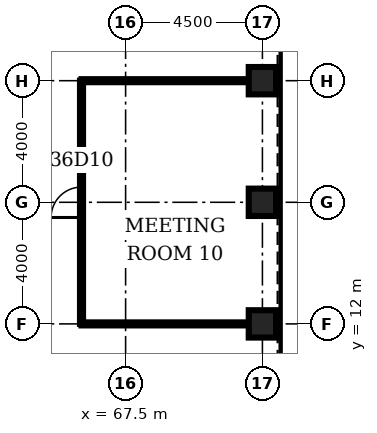
"""IFC4 building model, lengths in metres.
Left out: names, types, materials, properties, quantities, classifications, styles, units other than length and angle.
Written with IfcOpenShell. Run it as: python <this file> out.ifc"""

import sys

from ifc_helpers import new_model, si_unit, direction, frame, frame_2d, origin, origin_2d, place, context, subcontext, project, spatial, rectangle, hollow_rectangle, extrude, element, fill, save


model = new_model("IFC4")
c1 = context("Model", 3, precision=1e-05, world=origin(), true_north=direction((0.0, 1.0)))
c2 = subcontext(c1, "Body", "Model", "MODEL_VIEW")
j1 = project(units=[si_unit("LENGTHUNIT", "METRE"), si_unit("PLANEANGLEUNIT", "RADIAN")], contexts=[c1])
p1 = place(None, origin())
s1 = spatial("IfcSite", under=j1, at=p1, CompositionType="ELEMENT")
p2 = place(p1, origin())
s2 = spatial("IfcBuilding", under=s1, at=p2, CompositionType="ELEMENT")
p3 = place(p2, frame((0.0, 0.0, 163.5)))
s3 = spatial("IfcBuildingStorey", under=s2, at=p3, CompositionType="ELEMENT", Elevation=163.5)
for number, where, z_axis, x_axis in (
    (1, (72.0, 12.0, 0.0), (0.0, 0.0, 1.0), (1.0, 0.0, 0.0)),
    (2, (72.0, 16.0, 0.0), (0.0, 0.0, 1.0), (1.0, 0.0, 0.0)),
    (3, (72.0, 20.0, 0.0), (0.0, 0.0, 1.0), (1.0, 0.0, 0.0)),
):
    element("IfcColumn", number, at=place(p3, frame(where, z_axis=z_axis, x_axis=x_axis)), inside=s3, PredefinedType="COLUMN", context=c2, shape_type="SweptSolid", body=[
        extrude(hollow_rectangle(XDim=0.9, YDim=0.9, WallThickness=0.09, at=origin_2d()), origin(), (0.0, 0.0, 1.0), 4.2),
    ])
for number, where, z_axis, x_axis in (
    (4, (66.05, 12.0, 0.0), (0.0, 0.0, 1.0), (1.0, 0.0, 0.0)),
    (5, (66.05, 20.0, 0.0), (0.0, 0.0, 1.0), (1.0, 0.0, 0.0)),
):
    element("IfcWall", number, at=place(p3, frame(where, z_axis=z_axis, x_axis=x_axis)), inside=s3, PredefinedType="PARTITIONING", context=c2, shape_type="SweptSolid", body=[
        extrude(rectangle(XDim=5.5, YDim=0.1, at=frame_2d((2.75, 0.0))), origin(), (0.0, 0.0, 1.0), 3.0),
    ])
p4 = place(p3, frame((66.05, 12.0, 0.0), z_axis=(0.0, 0.0, 1.0), x_axis=(0.0, 1.0, 0.0)))
e6 = element("IfcWall", 6, at=p4, inside=s3, PredefinedType="PARTITIONING", context=c2, shape_type="SweptSolid", body=[
    extrude(rectangle(XDim=8.0, YDim=0.1, at=frame_2d((4.0, 0.0))), origin(), (0.0, 0.0, 1.0), 3.0),
])
p5 = place(p4, frame((3.5, 0.0, 0.0)))
e7 = element("IfcOpeningElement", 7, at=p5, cuts=e6, PredefinedType="OPENING", context=c2, shape_type="SweptSolid", body=[
    extrude(rectangle(XDim=1.0, YDim=2.1, at=frame_2d((0.5, 1.05))), frame((0.0, 0.06, 0.0), z_axis=(0.0, -1.0, 0.0), x_axis=(1.0, 0.0, 0.0)), (0.0, 0.0, 1.0), 0.12),
])
p6 = place(p5, origin())
e8 = element("IfcDoor", 8, at=p6, inside=s3, OperationType="SINGLE_SWING_LEFT", PredefinedType="DOOR", context=c2, shape_type="SweptSolid", body=[
    extrude(rectangle(XDim=1.0, YDim=2.1, at=frame_2d((0.5, 1.05))), frame((0.0, 0.025, 0.0), z_axis=(0.0, -1.0, 0.0), x_axis=(1.0, 0.0, 0.0)), (0.0, 0.0, 1.0), 0.05),
])
fill(e7, e8)
save(model, sys.argv[1])
